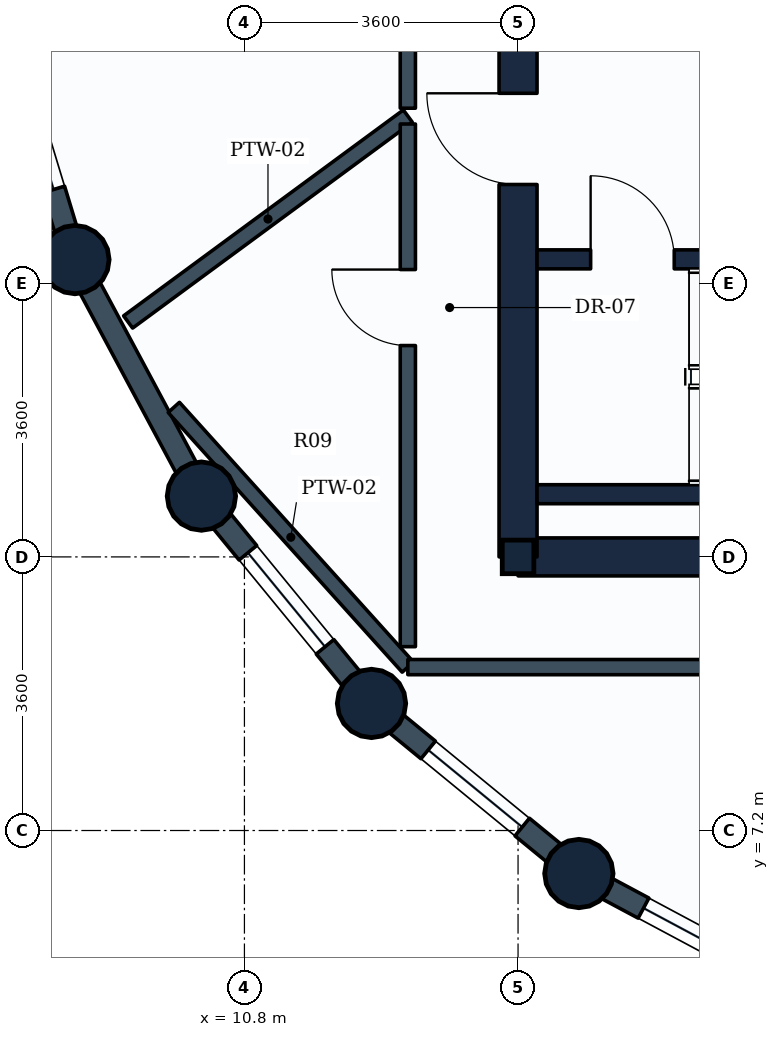
"""IFC4 building model, lengths in metres.
Left out: names, types, materials, properties, quantities, classifications, styles, units other than length and angle.
Written with IfcOpenShell. Run it as: python <this file> out.ifc"""

import sys

from ifc_helpers import new_model, si_unit, direction, frame, frame_2d, origin, origin_2d, place, context, subcontext, project, spatial, rectangle, circle, i_section, extrude, element, fill, save


model = new_model("IFC4")
c1 = context("Model", 3, precision=1e-05, world=origin(), true_north=direction((0.0, 1.0)))
c2 = subcontext(c1, "Body", "Model", "MODEL_VIEW")
j1 = project(units=[si_unit("LENGTHUNIT", "METRE"), si_unit("PLANEANGLEUNIT", "RADIAN")], contexts=[c1])
p1 = place(None, origin())
s1 = spatial("IfcSite", under=j1, at=p1, CompositionType="ELEMENT")
p2 = place(p1, origin())
s2 = spatial("IfcBuilding", under=s1, at=p2, CompositionType="ELEMENT")
p3 = place(p2, frame((0.0, 0.0, 131.4)))
s3 = spatial("IfcBuildingStorey", under=s2, at=p3, CompositionType="ELEMENT", Elevation=131.4)
for number, where, z_axis, x_axis in (
    (1, (8.57, 14.712, 0.0), (0.0, 0.0, 1.0), (1.0, 0.0, 0.0)),
    (2, (10.234, 11.6, 0.0), (0.0, 0.0, 1.0), (1.0, 0.0, 0.0)),
    (3, (12.472, 8.872, 0.0), (0.0, 0.0, 1.0), (1.0, 0.0, 0.0)),
):
    element("IfcColumn", number, at=place(p3, frame(where, z_axis=z_axis, x_axis=x_axis)), inside=s3, PredefinedType="COLUMN", context=c2, shape_type="SweptSolid", body=[
        extrude(circle(Radius=0.45, at=origin_2d()), origin(), (0.0, 0.0, 1.0), 3.8),
    ])
p4 = place(p3, frame((14.4, 10.8, 0.0), z_axis=(0.0, 0.0, 1.0), x_axis=(1.0, 0.0, 0.0)))
e4 = element("IfcColumn", 4, at=p4, inside=s3, PredefinedType="COLUMN", context=c2, shape_type="SweptSolid", body=[
    extrude(i_section(OverallWidth=0.416, OverallDepth=0.442, WebThickness=0.025, FlangeThickness=0.041, FilletRadius=0.015, at=origin_2d()), origin(), (0.0, 0.0, 1.0), 3.8),
])
p5 = place(p3, frame((15.2, 6.634, 0.0), z_axis=(0.0, 0.0, 1.0), x_axis=(1.0, 0.0, 0.0)))
e5 = element("IfcColumn", 5, at=p5, inside=s3, PredefinedType="COLUMN", context=c2, shape_type="SweptSolid", body=[
    extrude(circle(Radius=0.45, at=origin_2d()), origin(), (0.0, 0.0, 1.0), 3.8),
])
p6 = place(p3, frame((8.57, 14.712, 0.0), z_axis=(0.0, 0.0, 1.0), x_axis=(-0.290305086481, 0.956934144423, 0.0)))
e6 = element("IfcWall", 6, at=p6, inside=s3, PredefinedType="STANDARD", context=c2, shape_type="SweptSolid", body=[
    extrude(rectangle(XDim=3.528, YDim=0.3, at=frame_2d((1.764, 0.0))), origin(), (0.0, 0.0, 1.0), 2.93),
])
p7 = place(p6, frame((0.964, 0.0, 0.85)))
e7 = element("IfcOpeningElement", 7, at=p7, cuts=e6, PredefinedType="OPENING", context=c2, shape_type="SweptSolid", body=[
    extrude(rectangle(XDim=1.6, YDim=1.35, at=frame_2d((0.8, 0.675))), frame((0.0, 0.16, 0.0), z_axis=(0.0, -1.0, 0.0), x_axis=(1.0, 0.0, 0.0)), (0.0, 0.0, 1.0), 0.32),
])
p8 = place(p3, frame((10.234, 11.6, 0.0), z_axis=(0.0, 0.0, 1.0), x_axis=(-0.47151087309, 0.881860247748, 0.0)))
e8 = element("IfcWall", 8, at=p8, inside=s3, PredefinedType="STANDARD", context=c2, shape_type="SweptSolid", body=[
    extrude(rectangle(XDim=3.529, YDim=0.3, at=frame_2d((1.764, 0.0))), origin(), (0.0, 0.0, 1.0), 2.93),
])
p9 = place(p3, frame((12.472, 8.872, 0.0), z_axis=(0.0, 0.0, 1.0), x_axis=(-0.634258295121, 0.773121216285, 0.0)))
e9 = element("IfcWall", 9, at=p9, inside=s3, PredefinedType="STANDARD", context=c2, shape_type="SweptSolid", body=[
    extrude(rectangle(XDim=3.529, YDim=0.3, at=frame_2d((1.764, 0.0))), origin(), (0.0, 0.0, 1.0), 2.93),
])
p10 = place(p9, frame((0.964, 0.0, 0.85)))
e10 = element("IfcOpeningElement", 10, at=p10, cuts=e9, PredefinedType="OPENING", context=c2, shape_type="SweptSolid", body=[
    extrude(rectangle(XDim=1.6, YDim=1.35, at=frame_2d((0.8, 0.675))), frame((0.0, 0.16, 0.0), z_axis=(0.0, -1.0, 0.0), x_axis=(1.0, 0.0, 0.0)), (0.0, 0.0, 1.0), 0.32),
])
p11 = place(p3, frame((15.2, 6.634, 0.0), z_axis=(0.0, 0.0, 1.0), x_axis=(-0.773121216285, 0.634258295121, 0.0)))
e11 = element("IfcWall", 11, at=p11, inside=s3, PredefinedType="STANDARD", context=c2, shape_type="SweptSolid", body=[
    extrude(rectangle(XDim=3.529, YDim=0.3, at=frame_2d((1.764, 0.0))), origin(), (0.0, 0.0, 1.0), 2.93),
])
p12 = place(p11, frame((0.964, 0.0, 0.85)))
e12 = element("IfcOpeningElement", 12, at=p12, cuts=e11, PredefinedType="OPENING", context=c2, shape_type="SweptSolid", body=[
    extrude(rectangle(XDim=1.6, YDim=1.35, at=frame_2d((0.8, 0.675))), frame((0.0, 0.16, 0.0), z_axis=(0.0, -1.0, 0.0), x_axis=(1.0, 0.0, 0.0)), (0.0, 0.0, 1.0), 0.32),
])
p13 = place(p3, frame((18.312, 4.97, 0.0), z_axis=(0.0, 0.0, 1.0), x_axis=(-0.881846862014, 0.471535907389, 0.0)))
e13 = element("IfcWall", 13, at=p13, inside=s3, PredefinedType="STANDARD", context=c2, shape_type="SweptSolid", body=[
    extrude(rectangle(XDim=3.529, YDim=0.3, at=frame_2d((1.765, 0.0))), origin(), (0.0, 0.0, 1.0), 2.93),
])
p14 = place(p13, frame((0.964, 0.0, 0.85)))
e14 = element("IfcOpeningElement", 14, at=p14, cuts=e13, PredefinedType="OPENING", context=c2, shape_type="SweptSolid", body=[
    extrude(rectangle(XDim=1.6, YDim=1.35, at=frame_2d((0.8, 0.675))), frame((0.0, 0.16, 0.0), z_axis=(0.0, -1.0, 0.0), x_axis=(1.0, 0.0, 0.0)), (0.0, 0.0, 1.0), 0.32),
])
p15 = place(p3, frame((14.4, 10.8, 0.0), z_axis=(0.0, 0.0, 1.0), x_axis=(1.0, 0.0, 0.0)))
e15 = element("IfcWall", 15, at=p15, inside=s3, PredefinedType="SHEAR", context=c2, shape_type="SweptSolid", body=[
    extrude(rectangle(XDim=18.0, YDim=0.5, at=frame_2d((9.0, 0.0))), origin(), (0.0, 0.0, 1.0), 3.55),
])
p16 = place(p3, frame((14.4, 10.8, 0.0), z_axis=(0.0, 0.0, 1.0), x_axis=(0.0, 1.0, 0.0)))
e16 = element("IfcWall", 16, at=p16, inside=s3, PredefinedType="SHEAR", context=c2, shape_type="SweptSolid", body=[
    extrude(rectangle(XDim=14.4, YDim=0.5, at=frame_2d((7.2, 0.0))), origin(), (0.0, 0.0, 1.0), 3.55),
])
p17 = place(p16, frame((11.05, 0.0, 0.0)))
e17 = element("IfcOpeningElement", 17, at=p17, cuts=e16, PredefinedType="OPENING", context=c2, shape_type="SweptSolid", body=[
    extrude(rectangle(XDim=1.1, YDim=2.1, at=frame_2d((0.55, 1.05))), frame((0.0, 0.26, 0.0), z_axis=(0.0, -1.0, 0.0), x_axis=(1.0, 0.0, 0.0)), (0.0, 0.0, 1.0), 0.52),
])
p18 = place(p16, frame((4.9, 0.0, 0.0)))
e18 = element("IfcOpeningElement", 18, at=p18, cuts=e16, PredefinedType="OPENING", context=c2, shape_type="SweptSolid", body=[
    extrude(rectangle(XDim=1.2, YDim=2.1, at=frame_2d((0.6, 1.05))), frame((0.0, 0.26, 0.0), z_axis=(0.0, -1.0, 0.0), x_axis=(1.0, 0.0, 0.0)), (0.0, 0.0, 1.0), 0.52),
])
p19 = place(p16, frame((8.15, 0.0, 0.0)))
e19 = element("IfcOpeningElement", 19, at=p19, cuts=e16, PredefinedType="OPENING", context=c2, shape_type="SweptSolid", body=[
    extrude(rectangle(XDim=0.9, YDim=2.1, at=frame_2d((0.45, 1.05))), frame((0.0, 0.26, 0.0), z_axis=(0.0, -1.0, 0.0), x_axis=(1.0, 0.0, 0.0)), (0.0, 0.0, 1.0), 0.52),
])
p20 = place(p3, frame((14.65, 11.625, 0.0), z_axis=(0.0, 0.0, 1.0), x_axis=(1.0, 0.0, 0.0)))
e20 = element("IfcWall", 20, at=p20, inside=s3, PredefinedType="SHEAR", context=c2, shape_type="SweptSolid", body=[
    extrude(rectangle(XDim=8.7, YDim=0.25, at=frame_2d((4.35, 0.0))), origin(), (0.0, 0.0, 1.0), 3.55),
])
p21 = place(p3, frame((14.65, 14.715, 0.0), z_axis=(0.0, 0.0, 1.0), x_axis=(1.0, 0.0, 0.0)))
e21 = element("IfcWall", 21, at=p21, inside=s3, PredefinedType="SHEAR", context=c2, shape_type="SweptSolid", body=[
    extrude(rectangle(XDim=8.7, YDim=0.25, at=frame_2d((4.35, 0.0))), origin(), (0.0, 0.0, 1.0), 3.55),
])
p22 = place(p21, frame((0.705, 0.0, 0.0)))
e22 = element("IfcOpeningElement", 22, at=p22, cuts=e21, PredefinedType="OPENING", context=c2, shape_type="SweptSolid", body=[
    extrude(rectangle(XDim=1.1, YDim=2.1, at=frame_2d((0.55, 1.05))), frame((0.0, 0.135, 0.0), z_axis=(0.0, -1.0, 0.0), x_axis=(1.0, 0.0, 0.0)), (0.0, 0.0, 1.0), 0.27),
])
p23 = place(p3, frame((12.95, 9.35, 0.0), z_axis=(0.0, 0.0, 1.0), x_axis=(-0.669422074366, 0.742882282971, 0.0)))
e23 = element("IfcWall", 23, at=p23, inside=s3, PredefinedType="PARTITIONING", context=c2, shape_type="SweptSolid", body=[
    extrude(rectangle(XDim=4.6, YDim=0.2, at=frame_2d((2.3, 0.0))), origin(), (0.0, 0.0, 1.0), 2.93),
])
p24 = place(p3, frame((12.95, 16.6, 0.0), z_axis=(0.0, 0.0, 1.0), x_axis=(-0.805365932827, -0.592777963694, 0.0)))
e24 = element("IfcWall", 24, at=p24, inside=s3, PredefinedType="PARTITIONING", context=c2, shape_type="SweptSolid", body=[
    extrude(rectangle(XDim=4.57, YDim=0.2, at=frame_2d((2.285, 0.0))), origin(), (0.0, 0.0, 1.0), 2.93),
])
p25 = place(p3, frame((12.95, 16.704, 0.0), z_axis=(0.0, 0.0, 1.0), x_axis=(0.0, 1.0, 0.0)))
e25 = element("IfcWall", 25, at=p25, inside=s3, PredefinedType="PARTITIONING", context=c2, shape_type="SweptSolid", body=[
    extrude(rectangle(XDim=8.417, YDim=0.2, at=frame_2d((4.208, 0.0))), origin(), (0.0, 0.0, 1.0), 3.18),
])
p26 = place(p25, frame((3.696, 0.0, 0.0)))
e26 = element("IfcOpeningElement", 26, at=p26, cuts=e25, PredefinedType="OPENING", context=c2, shape_type="SweptSolid", body=[
    extrude(rectangle(XDim=1.0, YDim=2.1, at=frame_2d((0.5, 1.05))), frame((0.0, 0.11, 0.0), z_axis=(0.0, -1.0, 0.0), x_axis=(1.0, 0.0, 0.0)), (0.0, 0.0, 1.0), 0.22),
])
p27 = place(p3, frame((12.95, 9.619, 0.0), z_axis=(0.0, 0.0, 1.0), x_axis=(0.0, 1.0, 0.0)))
e27 = element("IfcWall", 27, at=p27, inside=s3, PredefinedType="PARTITIONING", context=c2, shape_type="SweptSolid", body=[
    extrude(rectangle(XDim=6.877, YDim=0.2, at=frame_2d((3.438, 0.0))), origin(), (0.0, 0.0, 1.0), 3.17),
])
p28 = place(p27, frame((3.962, 0.0, 0.0)))
e28 = element("IfcOpeningElement", 28, at=p28, cuts=e27, PredefinedType="OPENING", context=c2, shape_type="SweptSolid", body=[
    extrude(rectangle(XDim=1.0, YDim=2.1, at=frame_2d((0.5, 1.05))), frame((0.0, 0.11, 0.0), z_axis=(0.0, -1.0, 0.0), x_axis=(1.0, 0.0, 0.0)), (0.0, 0.0, 1.0), 0.22),
])
p29 = place(p3, frame((12.95, 9.35, 0.0), z_axis=(0.0, 0.0, 1.0), x_axis=(1.0, 0.0, 0.0)))
e29 = element("IfcWall", 29, at=p29, inside=s3, PredefinedType="PARTITIONING", context=c2, shape_type="SweptSolid", body=[
    extrude(rectangle(XDim=15.771, YDim=0.2, at=frame_2d((7.885, 0.0))), origin(), (0.0, 0.0, 1.0), 3.17),
])
p30 = place(p29, frame((4.836, 0.0, 0.0)))
e30 = element("IfcOpeningElement", 30, at=p30, cuts=e29, PredefinedType="OPENING", context=c2, shape_type="SweptSolid", body=[
    extrude(rectangle(XDim=1.0, YDim=2.1, at=frame_2d((0.5, 1.05))), frame((0.0, 0.11, 0.0), z_axis=(0.0, -1.0, 0.0), x_axis=(1.0, 0.0, 0.0)), (0.0, 0.0, 1.0), 0.22),
])
p31 = place(p7, origin())
e31 = element("IfcWindow", 31, at=p31, inside=s3, PartitioningType="SINGLE_PANEL", PredefinedType="WINDOW", context=c2, shape_type="SweptSolid", body=[
    extrude(rectangle(XDim=1.6, YDim=1.35, at=frame_2d((0.8, 0.675))), frame((0.0, 0.03, 0.0), z_axis=(0.0, -1.0, 0.0), x_axis=(1.0, 0.0, 0.0)), (0.0, 0.0, 1.0), 0.06),
])
fill(e7, e31)
p32 = place(p10, origin())
e32 = element("IfcWindow", 32, at=p32, inside=s3, PartitioningType="SINGLE_PANEL", PredefinedType="WINDOW", context=c2, shape_type="SweptSolid", body=[
    extrude(rectangle(XDim=1.6, YDim=1.35, at=frame_2d((0.8, 0.675))), frame((0.0, 0.03, 0.0), z_axis=(0.0, -1.0, 0.0), x_axis=(1.0, 0.0, 0.0)), (0.0, 0.0, 1.0), 0.06),
])
fill(e10, e32)
p33 = place(p12, origin())
e33 = element("IfcWindow", 33, at=p33, inside=s3, PartitioningType="SINGLE_PANEL", PredefinedType="WINDOW", context=c2, shape_type="SweptSolid", body=[
    extrude(rectangle(XDim=1.6, YDim=1.35, at=frame_2d((0.8, 0.675))), frame((0.0, 0.03, 0.0), z_axis=(0.0, -1.0, 0.0), x_axis=(1.0, 0.0, 0.0)), (0.0, 0.0, 1.0), 0.06),
])
fill(e12, e33)
p34 = place(p14, origin())
e34 = element("IfcWindow", 34, at=p34, inside=s3, PartitioningType="SINGLE_PANEL", PredefinedType="WINDOW", context=c2, shape_type="SweptSolid", body=[
    extrude(rectangle(XDim=1.6, YDim=1.35, at=frame_2d((0.8, 0.675))), frame((0.0, 0.03, 0.0), z_axis=(0.0, -1.0, 0.0), x_axis=(1.0, 0.0, 0.0)), (0.0, 0.0, 1.0), 0.06),
])
fill(e14, e34)
p35 = place(p22, origin())
e35 = element("IfcDoor", 35, at=p35, inside=s3, OperationType="SINGLE_SWING_LEFT", PredefinedType="DOOR", context=c2, shape_type="SweptSolid", body=[
    extrude(rectangle(XDim=1.1, YDim=2.1, at=frame_2d((0.55, 1.05))), frame((0.0, 0.025, 0.0), z_axis=(0.0, -1.0, 0.0), x_axis=(1.0, 0.0, 0.0)), (0.0, 0.0, 1.0), 0.05),
])
fill(e22, e35)
p36 = place(p18, origin())
e36 = element("IfcDoor", 36, at=p36, inside=s3, OperationType="SINGLE_SWING_RIGHT", PredefinedType="DOOR", context=c2, shape_type="SweptSolid", body=[
    extrude(rectangle(XDim=1.2, YDim=2.1, at=frame_2d((0.6, 1.05))), frame((0.0, 0.025, 0.0), z_axis=(0.0, -1.0, 0.0), x_axis=(1.0, 0.0, 0.0)), (0.0, 0.0, 1.0), 0.05),
])
fill(e18, e36)
p37 = place(p28, origin())
e37 = element("IfcDoor", 37, at=p37, inside=s3, OperationType="SINGLE_SWING_RIGHT", PredefinedType="DOOR", context=c2, shape_type="SweptSolid", body=[
    extrude(rectangle(XDim=1.0, YDim=2.1, at=frame_2d((0.5, 1.05))), frame((0.0, 0.025, 0.0), z_axis=(0.0, -1.0, 0.0), x_axis=(1.0, 0.0, 0.0)), (0.0, 0.0, 1.0), 0.05),
])
fill(e28, e37)
save(model, sys.argv[1])
